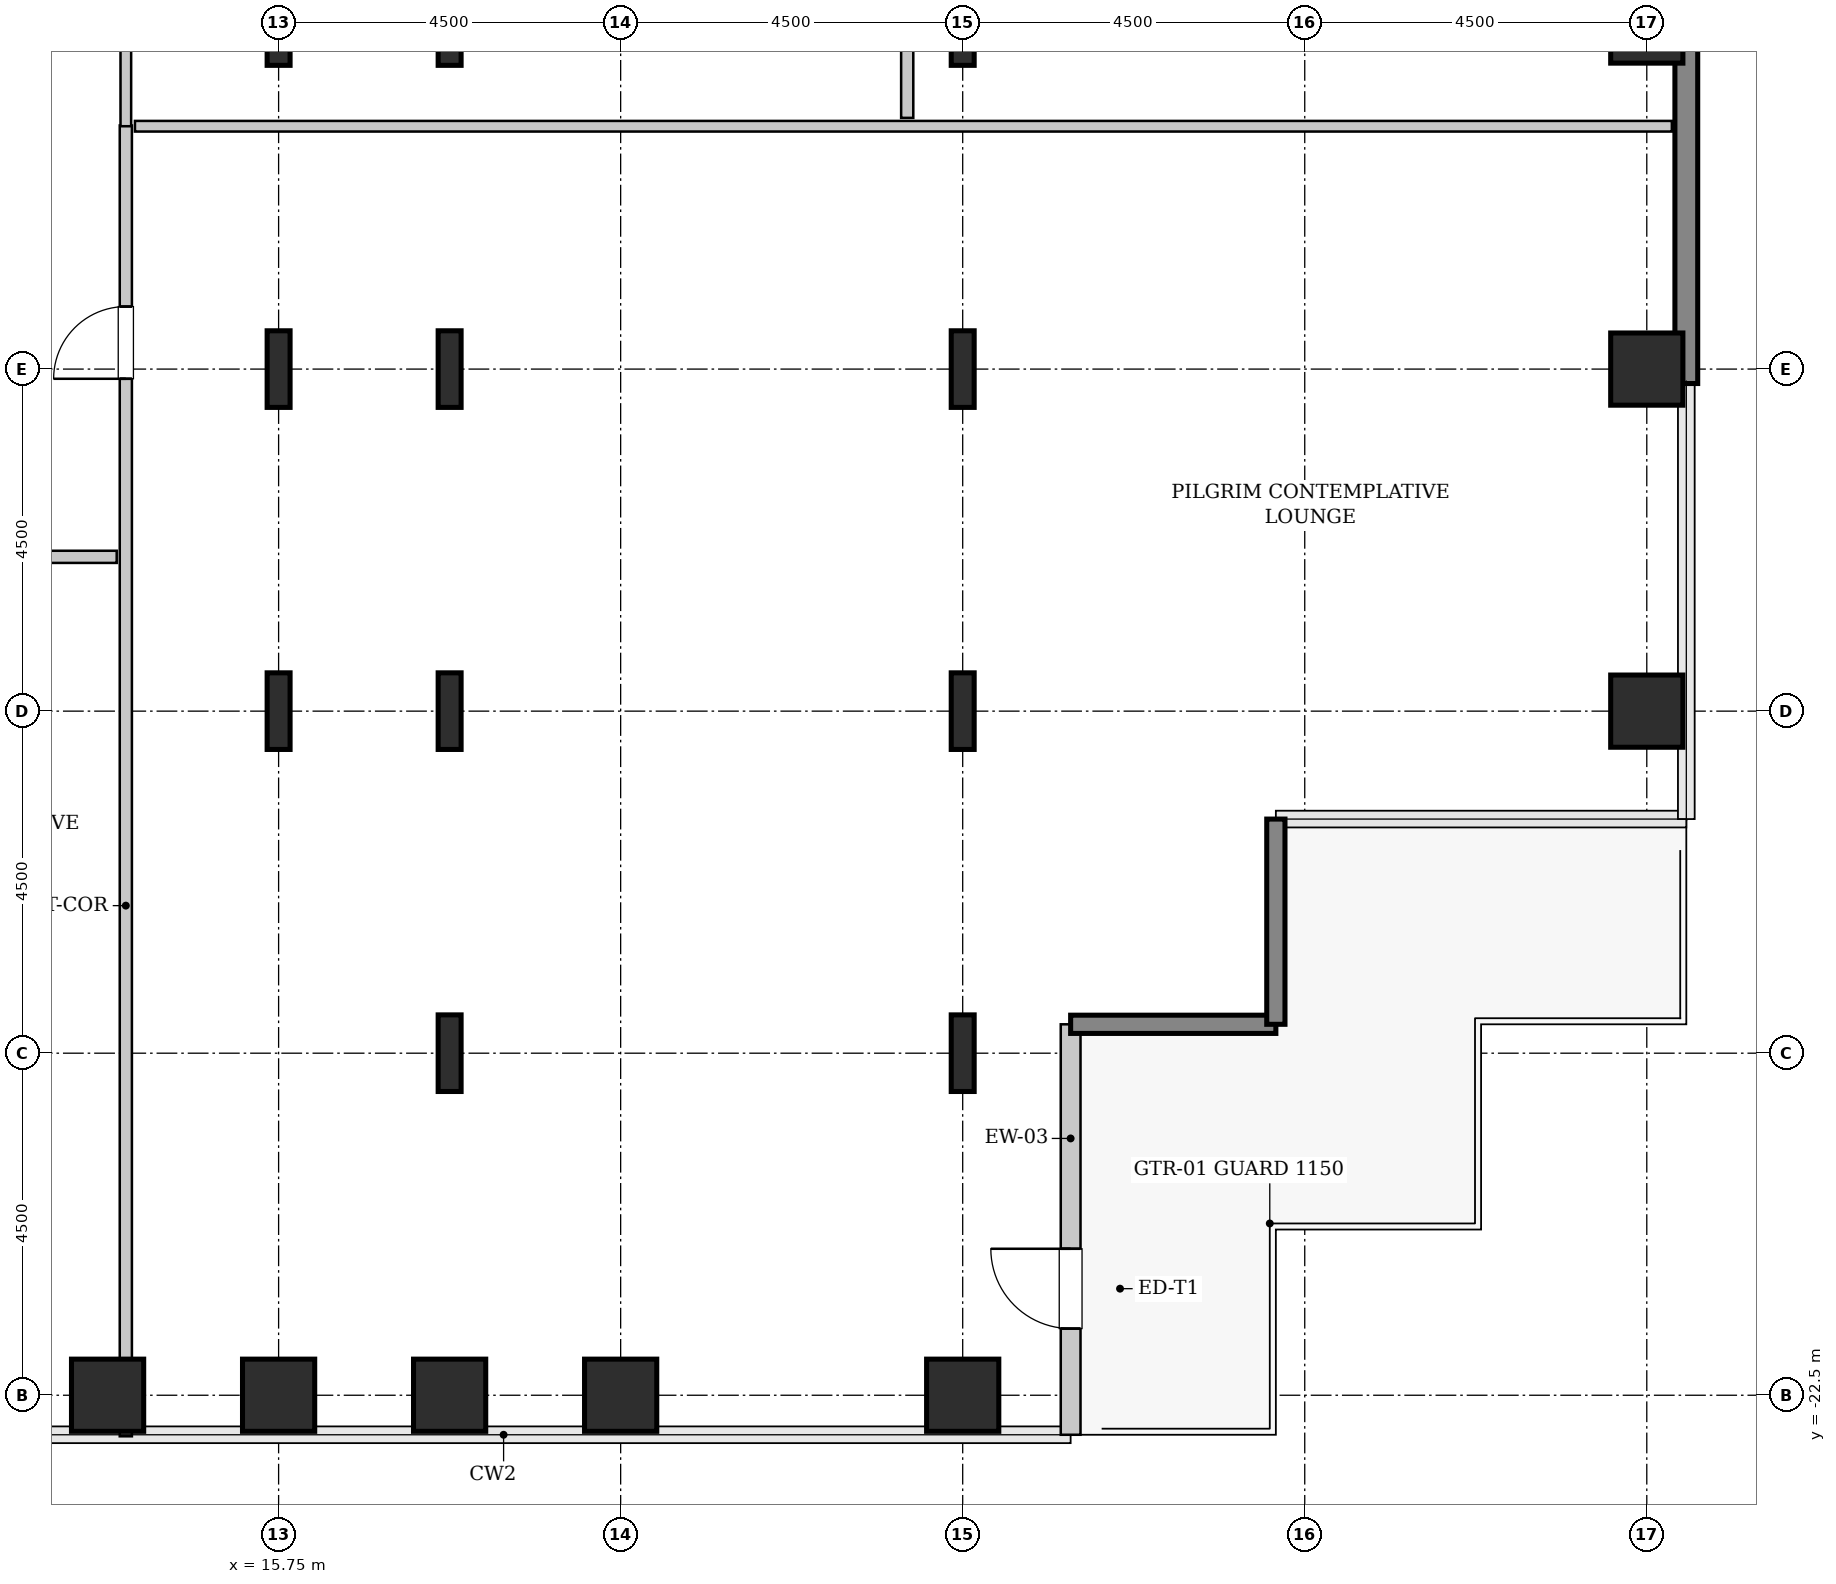
"""IFC4 building model, lengths in metres.
Left out: names, types, materials, properties, quantities, classifications, styles, units other than length and angle.
Written with IfcOpenShell. Run it as: python <this file> out.ifc"""

import sys

from ifc_helpers import new_model, si_unit, direction, frame, frame_2d, origin, origin_2d, place, context, subcontext, project, spatial, rectangle, hollow_rectangle, i_section, extrude, source, transform, mapped, element, fill, save


model = new_model("IFC4")
c1 = context("Model", 3, precision=1e-05, world=origin(), true_north=direction((0.0, 1.0)))
c2 = subcontext(c1, "Body", "Model", "MODEL_VIEW")
j1 = project(units=[si_unit("LENGTHUNIT", "METRE"), si_unit("PLANEANGLEUNIT", "RADIAN")], contexts=[c1])
p1 = place(None, origin())
s1 = spatial("IfcSite", under=j1, at=p1, CompositionType="ELEMENT")
p2 = place(p1, origin())
s2 = spatial("IfcBuilding", under=s1, at=p2, CompositionType="ELEMENT")
p3 = place(p2, frame((0.0, 0.0, 67.2)))
s3 = spatial("IfcBuildingStorey", under=s2, at=p3, CompositionType="ELEMENT", Elevation=67.2)
m1 = source(origin(), c2, "Body", "SweptSolid", [
    extrude(hollow_rectangle(XDim=0.95, YDim=0.95, WallThickness=0.045, InnerFilletRadius=0.045, OuterFilletRadius=0.09, at=origin_2d()), origin(), (0.0, 0.0, 1.0), 3.8),
])
for number, where, z_axis, x_axis in (
    (1, (13.5, -22.5, 0.0), (0.0, 0.0, 1.0), (1.0, 0.0, 0.0)),
    (2, (15.75, -22.5, 0.0), (0.0, 0.0, 1.0), (1.0, 0.0, 0.0)),
):
    element("IfcColumn", number, at=place(p3, frame(where, z_axis=z_axis, x_axis=x_axis)), inside=s3, PredefinedType="COLUMN", context=c2, shape_type="MappedRepresentation", body=[
        mapped(m1, transform((0.0, 0.0, 0.0), x_axis=(1.0, 0.0, 0.0), y_axis=(0.0, 1.0, 0.0), z_axis=(0.0, 0.0, 1.0), scale=1.0)),
    ])
m2 = source(origin(), c2, "Body", "SweptSolid", [
    extrude(i_section(OverallWidth=0.302, OverallDepth=1.008, WebThickness=0.021, FlangeThickness=0.04, FilletRadius=0.03, at=origin_2d()), origin(), (0.0, 0.0, 1.0), 3.8),
])
for number, where, z_axis, x_axis in (
    (3, (15.75, -13.5, 0.0), (0.0, 0.0, 1.0), (1.0, 0.0, 0.0)),
    (4, (15.75, -9.0, 0.0), (0.0, 0.0, 1.0), (1.0, 0.0, 0.0)),
    (5, (15.75, -4.5, 0.0), (0.0, 0.0, 1.0), (1.0, 0.0, 0.0)),
):
    element("IfcColumn", number, at=place(p3, frame(where, z_axis=z_axis, x_axis=x_axis)), inside=s3, PredefinedType="COLUMN", context=c2, shape_type="MappedRepresentation", body=[
        mapped(m2, transform((0.0, 0.0, 0.0), x_axis=(1.0, 0.0, 0.0), y_axis=(0.0, 1.0, 0.0), z_axis=(0.0, 0.0, 1.0), scale=1.0)),
    ])
p4 = place(p3, frame((18.0, -22.5, 0.0), z_axis=(0.0, 0.0, 1.0), x_axis=(1.0, 0.0, 0.0)))
e6 = element("IfcColumn", 6, at=p4, inside=s3, PredefinedType="COLUMN", context=c2, shape_type="MappedRepresentation", body=[
    mapped(m1, transform((0.0, 0.0, 0.0), x_axis=(1.0, 0.0, 0.0), y_axis=(0.0, 1.0, 0.0), z_axis=(0.0, 0.0, 1.0), scale=1.0)),
])
for number, where, z_axis, x_axis in (
    (7, (18.0, -18.0, 0.0), (0.0, 0.0, 1.0), (1.0, 0.0, 0.0)),
    (8, (18.0, -13.5, 0.0), (0.0, 0.0, 1.0), (1.0, 0.0, 0.0)),
    (9, (18.0, -9.0, 0.0), (0.0, 0.0, 1.0), (1.0, 0.0, 0.0)),
    (10, (18.0, -4.5, 0.0), (0.0, 0.0, 1.0), (1.0, 0.0, 0.0)),
):
    element("IfcColumn", number, at=place(p3, frame(where, z_axis=z_axis, x_axis=x_axis)), inside=s3, PredefinedType="COLUMN", context=c2, shape_type="MappedRepresentation", body=[
        mapped(m2, transform((0.0, 0.0, 0.0), x_axis=(1.0, 0.0, 0.0), y_axis=(0.0, 1.0, 0.0), z_axis=(0.0, 0.0, 1.0), scale=1.0)),
    ])
for number, where, z_axis, x_axis in (
    (11, (20.25, -22.5, 0.0), (0.0, 0.0, 1.0), (1.0, 0.0, 0.0)),
    (12, (24.75, -22.5, 0.0), (0.0, 0.0, 1.0), (1.0, 0.0, 0.0)),
):
    element("IfcColumn", number, at=place(p3, frame(where, z_axis=z_axis, x_axis=x_axis)), inside=s3, PredefinedType="COLUMN", context=c2, shape_type="MappedRepresentation", body=[
        mapped(m1, transform((0.0, 0.0, 0.0), x_axis=(1.0, 0.0, 0.0), y_axis=(0.0, 1.0, 0.0), z_axis=(0.0, 0.0, 1.0), scale=1.0)),
    ])
for number, where, z_axis, x_axis in (
    (13, (24.75, -18.0, 0.0), (0.0, 0.0, 1.0), (1.0, 0.0, 0.0)),
    (14, (24.75, -13.5, 0.0), (0.0, 0.0, 1.0), (1.0, 0.0, 0.0)),
    (15, (24.75, -9.0, 0.0), (0.0, 0.0, 1.0), (1.0, 0.0, 0.0)),
    (16, (24.75, -4.5, 0.0), (0.0, 0.0, 1.0), (1.0, 0.0, 0.0)),
):
    element("IfcColumn", number, at=place(p3, frame(where, z_axis=z_axis, x_axis=x_axis)), inside=s3, PredefinedType="COLUMN", context=c2, shape_type="MappedRepresentation", body=[
        mapped(m2, transform((0.0, 0.0, 0.0), x_axis=(1.0, 0.0, 0.0), y_axis=(0.0, 1.0, 0.0), z_axis=(0.0, 0.0, 1.0), scale=1.0)),
    ])
for number, where, z_axis, x_axis in (
    (17, (33.75, -13.5, 0.0), (0.0, 0.0, 1.0), (1.0, 0.0, 0.0)),
    (18, (33.75, -9.0, 0.0), (0.0, 0.0, 1.0), (1.0, 0.0, 0.0)),
    (19, (33.75, -4.5, 0.0), (0.0, 0.0, 1.0), (1.0, 0.0, 0.0)),
):
    element("IfcColumn", number, at=place(p3, frame(where, z_axis=z_axis, x_axis=x_axis)), inside=s3, PredefinedType="COLUMN", context=c2, shape_type="MappedRepresentation", body=[
        mapped(m1, transform((0.0, 0.0, 0.0), x_axis=(1.0, 0.0, 0.0), y_axis=(0.0, 1.0, 0.0), z_axis=(0.0, 0.0, 1.0), scale=1.0)),
    ])
m3 = source(origin(), c2, "Body", "SweptSolid", [
    extrude(rectangle(XDim=4.88, YDim=0.3, at=frame_2d((2.44, 0.0))), origin(), (0.0, 0.0, 1.0), 3.55),
])
p5 = place(p3, frame((34.27, -9.19, 0.0), z_axis=(0.0, 0.0, 1.0), x_axis=(0.0, 1.0, 0.0)))
e20 = element("IfcWall", 20, at=p5, inside=s3, PredefinedType="SHEAR", context=c2, shape_type="MappedRepresentation", body=[
    mapped(m3, transform((0.0, 0.0, 0.0), x_axis=(1.0, 0.0, 0.0), y_axis=(0.0, 1.0, 0.0), z_axis=(0.0, 0.0, 1.0), scale=1.0)),
])
m4 = source(origin(), c2, "Body", "SweptSolid", [
    extrude(rectangle(XDim=5.4, YDim=0.26, at=frame_2d((2.7, 0.0))), origin(), (0.0, 0.0, 1.0), 3.55),
])
p6 = place(p3, frame((26.17, -23.02, 0.0), z_axis=(0.0, 0.0, 1.0), x_axis=(0.0, 1.0, 0.0)))
e21 = element("IfcWall", 21, at=p6, inside=s3, PredefinedType="SOLIDWALL", context=c2, shape_type="MappedRepresentation", body=[
    mapped(m4, transform((0.0, 0.0, 0.0), x_axis=(1.0, 0.0, 0.0), y_axis=(0.0, 1.0, 0.0), z_axis=(0.0, 0.0, 1.0), scale=1.0)),
])
p7 = place(p6, frame((1.397, 0.0, 0.0)))
e22 = element("IfcOpeningElement", 22, at=p7, cuts=e21, PredefinedType="OPENING", context=c2, shape_type="SweptSolid", body=[
    extrude(rectangle(XDim=1.05, YDim=2.2, at=frame_2d((0.525, 1.1))), frame((0.0, 0.14, 0.0), z_axis=(0.0, -1.0, 0.0), x_axis=(1.0, 0.0, 0.0)), (0.0, 0.0, 1.0), 0.28),
])
m5 = source(origin(), c2, "Body", "SweptSolid", [
    extrude(rectangle(XDim=2.7, YDim=0.24, at=frame_2d((1.35, 0.0))), origin(), (0.0, 0.0, 1.0), 3.55),
])
for number, where, z_axis, x_axis in (
    (23, (26.17, -17.62, 0.0), (0.0, 0.0, 1.0), (1.0, 0.0, 0.0)),
    (24, (28.87, -17.62, 0.0), (0.0, 0.0, 1.0), (0.0, 1.0, 0.0)),
):
    element("IfcWall", number, at=place(p3, frame(where, z_axis=z_axis, x_axis=x_axis)), inside=s3, PredefinedType="SHEAR", context=c2, shape_type="MappedRepresentation", body=[
        mapped(m5, transform((0.0, 0.0, 0.0), x_axis=(1.0, 0.0, 0.0), y_axis=(0.0, 1.0, 0.0), z_axis=(0.0, 0.0, 1.0), scale=1.0)),
    ])
m6 = source(origin(), c2, "Body", "SweptSolid", [
    extrude(rectangle(XDim=17.245, YDim=0.16, at=frame_2d((8.623, 0.0))), origin(), (0.0, 0.0, 1.0), 3.535),
])
p8 = place(p3, frame((13.74, -23.04, 0.0), z_axis=(0.0, 0.0, 1.0), x_axis=(0.0, 1.0, 0.0)))
e25 = element("IfcWall", 25, at=p8, inside=s3, PredefinedType="PARTITIONING", context=c2, shape_type="MappedRepresentation", body=[
    mapped(m6, transform((0.0, 0.0, 0.0), x_axis=(1.0, 0.0, 0.0), y_axis=(0.0, 1.0, 0.0), z_axis=(0.0, 0.0, 1.0), scale=1.0)),
])
p9 = place(p8, frame((13.913, 0.0, 0.0)))
e26 = element("IfcOpeningElement", 26, at=p9, cuts=e25, PredefinedType="OPENING", context=c2, shape_type="SweptSolid", body=[
    extrude(rectangle(XDim=0.95, YDim=2.1, at=frame_2d((0.475, 1.05))), frame((0.0, 0.09, 0.0), z_axis=(0.0, -1.0, 0.0), x_axis=(1.0, 0.0, 0.0)), (0.0, 0.0, 1.0), 0.18),
])
m7 = source(origin(), c2, "Body", "SweptSolid", [
    extrude(rectangle(XDim=20.22, YDim=0.14, at=frame_2d((10.11, 0.0))), origin(), (0.0, 0.0, 1.0), 3.535),
])
p10 = place(p3, frame((13.86, -5.805, 0.0), z_axis=(0.0, 0.0, 1.0), x_axis=(1.0, 0.0, 0.0)))
e27 = element("IfcWall", 27, at=p10, inside=s3, PredefinedType="PARTITIONING", context=c2, shape_type="MappedRepresentation", body=[
    mapped(m7, transform((0.0, 0.0, 0.0), x_axis=(1.0, 0.0, 0.0), y_axis=(0.0, 1.0, 0.0), z_axis=(0.0, 0.0, 1.0), scale=1.0)),
])
m8 = source(origin(), c2, "Body", "SweptSolid", [
    extrude(rectangle(XDim=7.065, YDim=0.14, at=frame_2d((3.532, 0.0))), origin(), (0.0, 0.0, 1.0), 3.535),
])
p11 = place(p3, frame((13.74, -5.805, 0.0), z_axis=(0.0, 0.0, 1.0), x_axis=(0.0, 1.0, 0.0)))
e28 = element("IfcWall", 28, at=p11, inside=s3, PredefinedType="PARTITIONING", context=c2, shape_type="MappedRepresentation", body=[
    mapped(m8, transform((0.0, 0.0, 0.0), x_axis=(1.0, 0.0, 0.0), y_axis=(0.0, 1.0, 0.0), z_axis=(0.0, 0.0, 1.0), scale=1.0)),
])
m9 = source(origin(), c2, "Body", "SweptSolid", [
    extrude(rectangle(XDim=14.183, YDim=0.16, at=frame_2d((7.091, 0.0))), origin(), (0.0, 0.0, 1.0), 3.535),
])
p12 = place(p3, frame((24.02, -5.695, 0.0), z_axis=(0.0, 0.0, 1.0), x_axis=(0.0, 1.0, 0.0)))
e29 = element("IfcWall", 29, at=p12, inside=s3, PredefinedType="PARTITIONING", context=c2, shape_type="MappedRepresentation", body=[
    mapped(m9, transform((0.0, 0.0, 0.0), x_axis=(1.0, 0.0, 0.0), y_axis=(0.0, 1.0, 0.0), z_axis=(0.0, 0.0, 1.0), scale=1.0)),
])
p13 = place(p12, frame((7.47, 0.0, 0.0)))
e30 = element("IfcOpeningElement", 30, at=p13, cuts=e29, PredefinedType="OPENING", context=c2, shape_type="SweptSolid", body=[
    extrude(rectangle(XDim=0.95, YDim=2.1, at=frame_2d((0.475, 1.05))), frame((0.0, 0.09, 0.0), z_axis=(0.0, -1.0, 0.0), x_axis=(1.0, 0.0, 0.0)), (0.0, 0.0, 1.0), 0.18),
])
m10 = source(origin(), c2, "Body", "SweptSolid", [
    extrude(rectangle(XDim=3.56, YDim=0.16, at=frame_2d((1.78, 0.0))), origin(), (0.0, 0.0, 1.0), 3.535),
])
p14 = place(p3, frame((10.06, -11.47, 0.0), z_axis=(0.0, 0.0, 1.0), x_axis=(1.0, 0.0, 0.0)))
e31 = element("IfcWall", 31, at=p14, inside=s3, PredefinedType="PARTITIONING", context=c2, shape_type="MappedRepresentation", body=[
    mapped(m10, transform((0.0, 0.0, 0.0), x_axis=(1.0, 0.0, 0.0), y_axis=(0.0, 1.0, 0.0), z_axis=(0.0, 0.0, 1.0), scale=1.0)),
])
p15 = place(p14, frame((1.305, 0.0, 0.0)))
e32 = element("IfcOpeningElement", 32, at=p15, cuts=e31, PredefinedType="OPENING", context=c2, shape_type="SweptSolid", body=[
    extrude(rectangle(XDim=0.95, YDim=2.1, at=frame_2d((0.475, 1.05))), frame((0.0, 0.09, 0.0), z_axis=(0.0, -1.0, 0.0), x_axis=(1.0, 0.0, 0.0)), (0.0, 0.0, 1.0), 0.18),
])
m11 = source(origin(), c2, "Body", "SweptSolid", [
    extrude(rectangle(XDim=1.05, YDim=2.2, at=frame_2d((0.525, 1.1))), frame((0.0, 0.025, 0.0), z_axis=(0.0, -1.0, 0.0), x_axis=(1.0, 0.0, 0.0)), (0.0, 0.0, 1.0), 0.05),
])
p16 = place(p7, origin())
e33 = element("IfcDoor", 33, at=p16, inside=s3, OperationType="SINGLE_SWING_RIGHT", PredefinedType="DOOR", context=c2, shape_type="MappedRepresentation", body=[
    mapped(m11, transform((0.0, 0.0, 0.0), x_axis=(1.0, 0.0, 0.0), y_axis=(0.0, 1.0, 0.0), z_axis=(0.0, 0.0, 1.0), scale=1.0)),
])
fill(e22, e33)
m12 = source(origin(), c2, "Body", "SweptSolid", [
    extrude(rectangle(XDim=0.95, YDim=2.1, at=frame_2d((0.475, 1.05))), frame((0.0, 0.025, 0.0), z_axis=(0.0, -1.0, 0.0), x_axis=(1.0, 0.0, 0.0)), (0.0, 0.0, 1.0), 0.05),
])
p17 = place(p9, origin())
e34 = element("IfcDoor", 34, at=p17, inside=s3, OperationType="SINGLE_SWING_LEFT", PredefinedType="DOOR", context=c2, shape_type="MappedRepresentation", body=[
    mapped(m12, transform((0.0, 0.0, 0.0), x_axis=(1.0, 0.0, 0.0), y_axis=(0.0, 1.0, 0.0), z_axis=(0.0, 0.0, 1.0), scale=1.0)),
])
fill(e26, e34)
save(model, sys.argv[1])
